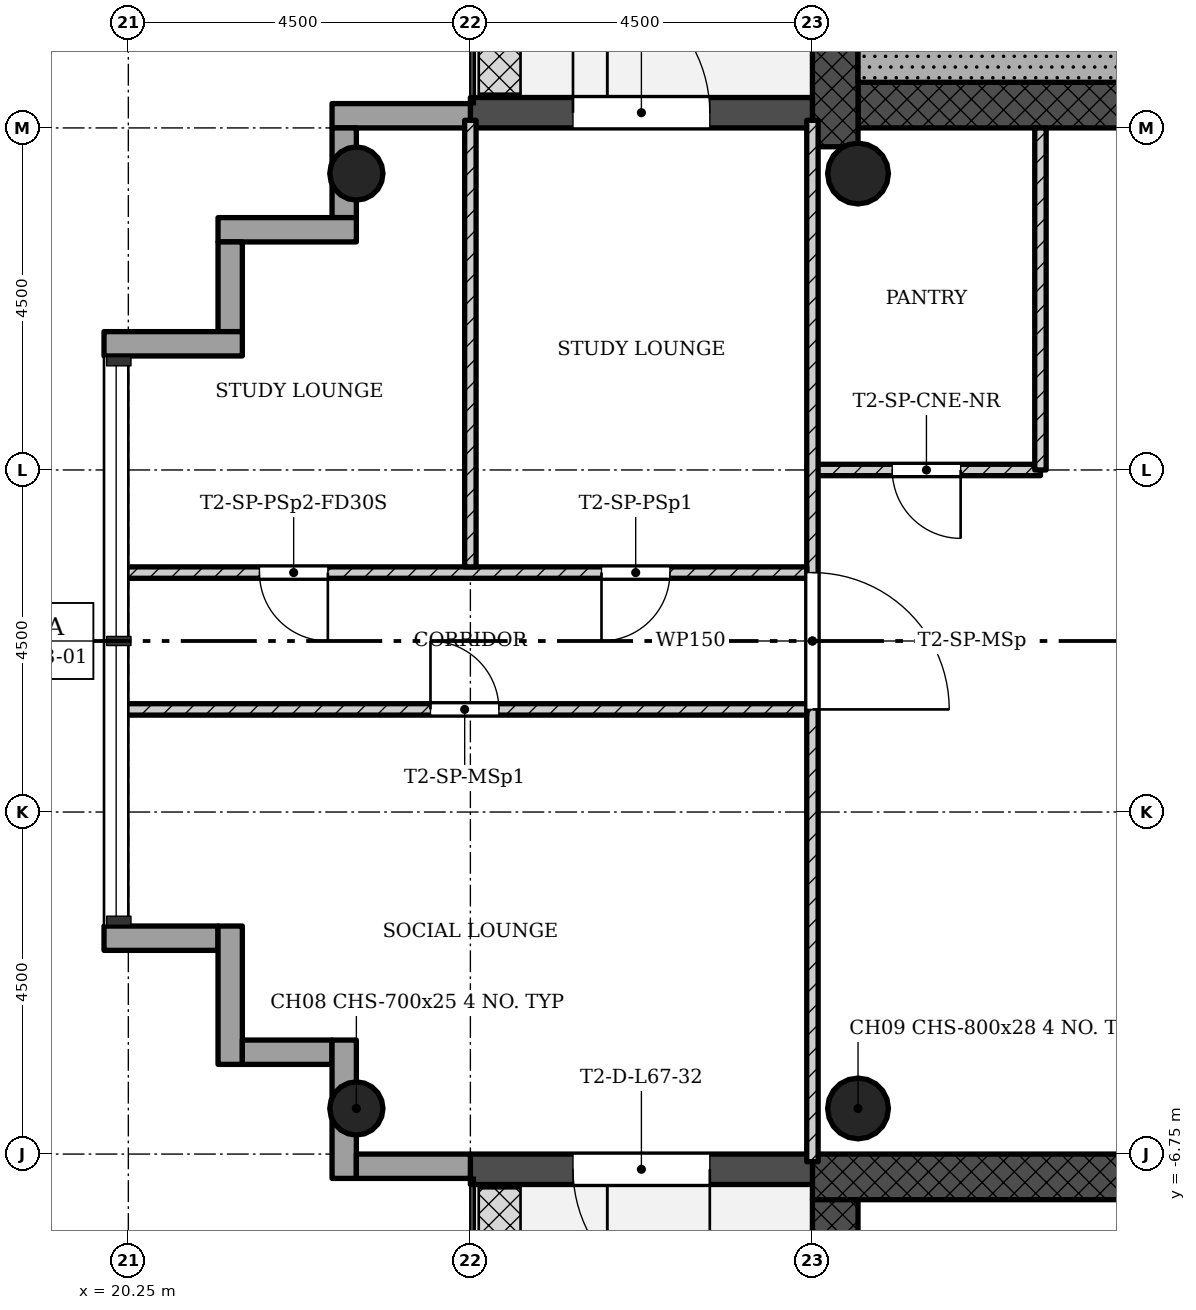
"""IFC4 building model, lengths in metres.
Left out: names, types, materials, properties, quantities, classifications, styles, units other than length and angle.
Written with IfcOpenShell. Run it as: python <this file> out.ifc"""

import sys

from ifc_helpers import new_model, si_unit, direction, frame, frame_2d, origin, origin_2d, place, context, subcontext, project, spatial, rectangle, hollow_circle, extrude, element, fill, save


model = new_model("IFC4")
c1 = context("Model", 3, precision=1e-05, world=origin(), true_north=direction((0.0, 1.0)))
c2 = subcontext(c1, "Body", "Model", "MODEL_VIEW")
j1 = project(units=[si_unit("LENGTHUNIT", "METRE"), si_unit("PLANEANGLEUNIT", "RADIAN")], contexts=[c1])
p1 = place(None, origin())
s1 = spatial("IfcSite", under=j1, at=p1, CompositionType="ELEMENT")
p2 = place(p1, origin())
s2 = spatial("IfcBuilding", under=s1, at=p2, CompositionType="ELEMENT")
p3 = place(p2, frame((0.0, 0.0, 242.4)))
s3 = spatial("IfcBuildingStorey", under=s2, at=p3, CompositionType="ELEMENT", Elevation=242.4)
p4 = place(p3, frame((29.85, 7.05, 0.0), z_axis=(0.0, 0.0, 1.0), x_axis=(1.0, 0.0, 0.0)))
e1 = element("IfcWall", 1, at=p4, inside=s3, PredefinedType="SHEAR", context=c2, shape_type="SweptSolid", body=[
    extrude(rectangle(XDim=12.9, YDim=0.6, at=frame_2d((6.45, 0.0))), origin(), (0.0, 0.0, 1.0), 4.5),
])
p5 = place(p4, frame((5.25, 0.0, 0.0)))
e2 = element("IfcOpeningElement", 2, at=p5, cuts=e1, PredefinedType="OPENING", context=c2, shape_type="SweptSolid", body=[
    extrude(rectangle(XDim=1.8, YDim=2.1, at=frame_2d((0.9, 1.05))), frame((0.0, 0.31, 0.0), z_axis=(0.0, -1.0, 0.0), x_axis=(1.0, 0.0, 0.0)), (0.0, 0.0, 1.0), 0.62),
])
p6 = place(p3, frame((29.55, 15.15, 0.0), z_axis=(0.0, 0.0, 1.0), x_axis=(0.0, -1.0, 0.0)))
e3 = element("IfcWall", 3, at=p6, inside=s3, PredefinedType="SHEAR", context=c2, shape_type="SweptSolid", body=[
    extrude(rectangle(XDim=8.648, YDim=0.6, at=frame_2d((4.324, 0.0))), origin(), (0.0, 0.0, 1.0), 4.5),
])
p7 = place(p3, frame((42.15, -7.05, 0.0), z_axis=(0.0, 0.0, 1.0), x_axis=(-1.0, 0.0, 0.0)))
e4 = element("IfcWall", 4, at=p7, inside=s3, PredefinedType="SHEAR", context=c2, shape_type="SweptSolid", body=[
    extrude(rectangle(XDim=12.9, YDim=0.6, at=frame_2d((6.45, 0.0))), origin(), (0.0, 0.0, 1.0), 4.5),
])
p8 = place(p7, frame((5.25, 0.0, 0.0)))
e5 = element("IfcOpeningElement", 5, at=p8, cuts=e4, PredefinedType="OPENING", context=c2, shape_type="SweptSolid", body=[
    extrude(rectangle(XDim=1.8, YDim=2.1, at=frame_2d((0.9, 1.05))), frame((0.0, 0.31, 0.0), z_axis=(0.0, -1.0, 0.0), x_axis=(1.0, 0.0, 0.0)), (0.0, 0.0, 1.0), 0.62),
])
p9 = place(p3, frame((29.55, -7.35, 0.0), z_axis=(0.0, 0.0, 1.0), x_axis=(0.0, -1.0, 0.0)))
e6 = element("IfcWall", 6, at=p9, inside=s3, PredefinedType="SHEAR", context=c2, shape_type="SweptSolid", body=[
    extrude(rectangle(XDim=8.4, YDim=0.6, at=frame_2d((4.2, 0.0))), origin(), (0.0, 0.0, 1.0), 4.5),
])
for number, where, z_axis, x_axis in (
    (7, (23.25, 6.15, 0.0), (0.0, 0.0, 1.0), (1.0, 0.0, 0.0)),
    (8, (23.25, -6.15, 0.0), (0.0, 0.0, 1.0), (1.0, 0.0, 0.0)),
):
    element("IfcColumn", number, at=place(p3, frame(where, z_axis=z_axis, x_axis=x_axis)), inside=s3, PredefinedType="COLUMN", context=c2, shape_type="SweptSolid", body=[
        extrude(hollow_circle(Radius=0.35, WallThickness=0.025, at=origin_2d()), origin(), (0.0, 0.0, 1.0), 4.5),
    ])
for number, where, z_axis, x_axis in (
    (9, (29.85, 6.15, 0.0), (0.0, 0.0, 1.0), (1.0, 0.0, 0.0)),
    (10, (29.85, -6.15, 0.0), (0.0, 0.0, 1.0), (1.0, 0.0, 0.0)),
):
    element("IfcColumn", number, at=place(p3, frame(where, z_axis=z_axis, x_axis=x_axis)), inside=s3, PredefinedType="COLUMN", context=c2, shape_type="SweptSolid", body=[
        extrude(hollow_circle(Radius=0.4, WallThickness=0.028, at=origin_2d()), origin(), (0.0, 0.0, 1.0), 4.5),
    ])
p10 = place(p3, frame((29.25, 6.95, -0.02), z_axis=(0.0, 0.0, 1.0), x_axis=(-1.0, 0.0, 0.0)))
e11 = element("IfcWall", 11, at=p10, inside=s3, PredefinedType="STANDARD", context=c2, shape_type="SweptSolid", body=[
    extrude(rectangle(XDim=4.5, YDim=0.4, at=frame_2d((2.25, 0.0))), origin(), (0.0, 0.0, 1.0), 4.22),
])
p11 = place(p10, frame((1.35, 0.0, 0.02)))
e12 = element("IfcOpeningElement", 12, at=p11, cuts=e11, PredefinedType="OPENING", context=c2, shape_type="SweptSolid", body=[
    extrude(rectangle(XDim=1.8, YDim=2.1, at=frame_2d((0.9, 1.05))), frame((0.0, 0.21, 0.0), z_axis=(0.0, -1.0, 0.0), x_axis=(1.0, 0.0, 0.0)), (0.0, 0.0, 1.0), 0.42),
])
p12 = place(p3, frame((24.75, 6.91, -0.3), z_axis=(0.0, 0.0, 1.0), x_axis=(-1.0, 0.0, 0.0)))
e13 = element("IfcWall", 13, at=p12, inside=s3, PredefinedType="STANDARD", context=c2, shape_type="SweptSolid", body=[
    extrude(rectangle(XDim=1.82, YDim=0.32, at=frame_2d((0.91, 0.0))), origin(), (0.0, 0.0, 1.0), 4.5),
])
p13 = place(p3, frame((23.09, 6.75, -0.3), z_axis=(0.0, 0.0, 1.0), x_axis=(0.0, -1.0, 0.0)))
e14 = element("IfcWall", 14, at=p13, inside=s3, PredefinedType="STANDARD", context=c2, shape_type="SweptSolid", body=[
    extrude(rectangle(XDim=1.18, YDim=0.32, at=frame_2d((0.59, 0.0))), origin(), (0.0, 0.0, 1.0), 4.5),
])
p14 = place(p3, frame((23.25, 5.41, -0.3), z_axis=(0.0, 0.0, 1.0), x_axis=(-1.0, 0.0, 0.0)))
e15 = element("IfcWall", 15, at=p14, inside=s3, PredefinedType="STANDARD", context=c2, shape_type="SweptSolid", body=[
    extrude(rectangle(XDim=1.82, YDim=0.32, at=frame_2d((0.91, 0.0))), origin(), (0.0, 0.0, 1.0), 4.5),
])
p15 = place(p3, frame((21.59, 5.25, -0.3), z_axis=(0.0, 0.0, 1.0), x_axis=(0.0, -1.0, 0.0)))
e16 = element("IfcWall", 16, at=p15, inside=s3, PredefinedType="STANDARD", context=c2, shape_type="SweptSolid", body=[
    extrude(rectangle(XDim=1.18, YDim=0.32, at=frame_2d((0.59, 0.0))), origin(), (0.0, 0.0, 1.0), 4.5),
])
p16 = place(p3, frame((21.75, 3.91, -0.3), z_axis=(0.0, 0.0, 1.0), x_axis=(-1.0, 0.0, 0.0)))
e17 = element("IfcWall", 17, at=p16, inside=s3, PredefinedType="STANDARD", context=c2, shape_type="SweptSolid", body=[
    extrude(rectangle(XDim=1.82, YDim=0.32, at=frame_2d((0.91, 0.0))), origin(), (0.0, 0.0, 1.0), 4.5),
])
p17 = place(p3, frame((19.93, -3.91, -0.3), z_axis=(0.0, 0.0, 1.0), x_axis=(1.0, 0.0, 0.0)))
e18 = element("IfcWall", 18, at=p17, inside=s3, PredefinedType="STANDARD", context=c2, shape_type="SweptSolid", body=[
    extrude(rectangle(XDim=1.5, YDim=0.32, at=frame_2d((0.75, 0.0))), origin(), (0.0, 0.0, 1.0), 4.5),
])
p18 = place(p3, frame((21.59, -3.75, -0.3), z_axis=(0.0, 0.0, 1.0), x_axis=(0.0, -1.0, 0.0)))
e19 = element("IfcWall", 19, at=p18, inside=s3, PredefinedType="STANDARD", context=c2, shape_type="SweptSolid", body=[
    extrude(rectangle(XDim=1.82, YDim=0.32, at=frame_2d((0.91, 0.0))), origin(), (0.0, 0.0, 1.0), 4.5),
])
p19 = place(p3, frame((21.75, -5.41, -0.3), z_axis=(0.0, 0.0, 1.0), x_axis=(1.0, 0.0, 0.0)))
e20 = element("IfcWall", 20, at=p19, inside=s3, PredefinedType="STANDARD", context=c2, shape_type="SweptSolid", body=[
    extrude(rectangle(XDim=1.18, YDim=0.32, at=frame_2d((0.59, 0.0))), origin(), (0.0, 0.0, 1.0), 4.5),
])
p20 = place(p3, frame((23.09, -5.25, -0.3), z_axis=(0.0, 0.0, 1.0), x_axis=(0.0, -1.0, 0.0)))
e21 = element("IfcWall", 21, at=p20, inside=s3, PredefinedType="STANDARD", context=c2, shape_type="SweptSolid", body=[
    extrude(rectangle(XDim=1.82, YDim=0.32, at=frame_2d((0.91, 0.0))), origin(), (0.0, 0.0, 1.0), 4.5),
])
p21 = place(p3, frame((23.25, -6.91, -0.3), z_axis=(0.0, 0.0, 1.0), x_axis=(1.0, 0.0, 0.0)))
e22 = element("IfcWall", 22, at=p21, inside=s3, PredefinedType="STANDARD", context=c2, shape_type="SweptSolid", body=[
    extrude(rectangle(XDim=1.5, YDim=0.32, at=frame_2d((0.75, 0.0))), origin(), (0.0, 0.0, 1.0), 4.5),
])
p22 = place(p3, frame((24.75, -6.95, -0.02), z_axis=(0.0, 0.0, 1.0), x_axis=(1.0, 0.0, 0.0)))
e23 = element("IfcWall", 23, at=p22, inside=s3, PredefinedType="STANDARD", context=c2, shape_type="SweptSolid", body=[
    extrude(rectangle(XDim=4.5, YDim=0.4, at=frame_2d((2.25, 0.0))), origin(), (0.0, 0.0, 1.0), 4.22),
])
p23 = place(p22, frame((1.35, 0.0, 0.02)))
e24 = element("IfcOpeningElement", 24, at=p23, cuts=e23, PredefinedType="OPENING", context=c2, shape_type="SweptSolid", body=[
    extrude(rectangle(XDim=1.8, YDim=2.1, at=frame_2d((0.9, 1.05))), frame((0.0, 0.21, 0.0), z_axis=(0.0, -1.0, 0.0), x_axis=(1.0, 0.0, 0.0)), (0.0, 0.0, 1.0), 0.42),
])
p24 = place(p3, frame((32.25, 2.25, 0.0), z_axis=(0.0, 0.0, 1.0), x_axis=(-1.0, 0.0, 0.0)))
e25 = element("IfcWall", 25, at=p24, inside=s3, PredefinedType="PARTITIONING", context=c2, shape_type="SweptSolid", body=[
    extrude(rectangle(XDim=3.0, YDim=0.15, at=frame_2d((1.5, 0.0))), origin(), (0.0, 0.0, 1.0), 4.08),
])
p25 = place(p24, frame((1.05, 0.0, 0.0)))
e26 = element("IfcOpeningElement", 26, at=p25, cuts=e25, PredefinedType="OPENING", context=c2, shape_type="SweptSolid", body=[
    extrude(rectangle(XDim=0.9, YDim=2.1, at=frame_2d((0.45, 1.05))), frame((0.0, 0.085, 0.0), z_axis=(0.0, -1.0, 0.0), x_axis=(1.0, 0.0, 0.0)), (0.0, 0.0, 1.0), 0.17),
])
p26 = place(p3, frame((32.25, 2.25, 0.0), z_axis=(0.0, 0.0, 1.0), x_axis=(0.0, 1.0, 0.0)))
e27 = element("IfcWall", 27, at=p26, inside=s3, PredefinedType="PARTITIONING", context=c2, shape_type="SweptSolid", body=[
    extrude(rectangle(XDim=4.5, YDim=0.15, at=frame_2d((2.25, 0.0))), origin(), (0.0, 0.0, 1.0), 4.08),
])
p27 = place(p3, frame((29.25, -6.85, 0.0), z_axis=(0.0, 0.0, 1.0), x_axis=(0.0, 1.0, 0.0)))
e28 = element("IfcWall", 28, at=p27, inside=s3, PredefinedType="PARTITIONING", context=c2, shape_type="SweptSolid", body=[
    extrude(rectangle(XDim=13.7, YDim=0.15, at=frame_2d((6.85, 0.0))), origin(), (0.0, 0.0, 1.0), 4.08),
])
p28 = place(p27, frame((5.95, 0.0, 0.0)))
e29 = element("IfcOpeningElement", 29, at=p28, cuts=e28, PredefinedType="OPENING", context=c2, shape_type="SweptSolid", body=[
    extrude(rectangle(XDim=1.8, YDim=2.1, at=frame_2d((0.9, 1.05))), frame((0.0, 0.085, 0.0), z_axis=(0.0, -1.0, 0.0), x_axis=(1.0, 0.0, 0.0)), (0.0, 0.0, 1.0), 0.17),
])
p29 = place(p3, frame((29.175, 0.9, 0.0), z_axis=(0.0, 0.0, 1.0), x_axis=(-1.0, 0.0, 0.0)))
e30 = element("IfcWall", 30, at=p29, inside=s3, PredefinedType="PARTITIONING", context=c2, shape_type="SweptSolid", body=[
    extrude(rectangle(XDim=9.025, YDim=0.15, at=frame_2d((4.513, 0.0))), origin(), (0.0, 0.0, 1.0), 4.08),
])
p30 = place(p29, frame((1.8, 0.0, 0.0)))
e31 = element("IfcOpeningElement", 31, at=p30, cuts=e30, PredefinedType="OPENING", context=c2, shape_type="SweptSolid", body=[
    extrude(rectangle(XDim=0.9, YDim=2.1, at=frame_2d((0.45, 1.05))), frame((0.0, 0.085, 0.0), z_axis=(0.0, -1.0, 0.0), x_axis=(1.0, 0.0, 0.0)), (0.0, 0.0, 1.0), 0.17),
])
p31 = place(p29, frame((6.3, 0.0, 0.0)))
e32 = element("IfcOpeningElement", 32, at=p31, cuts=e30, PredefinedType="OPENING", context=c2, shape_type="SweptSolid", body=[
    extrude(rectangle(XDim=0.9, YDim=2.1, at=frame_2d((0.45, 1.05))), frame((0.0, 0.085, 0.0), z_axis=(0.0, -1.0, 0.0), x_axis=(1.0, 0.0, 0.0)), (0.0, 0.0, 1.0), 0.17),
])
p32 = place(p3, frame((24.75, 0.975, 0.0), z_axis=(0.0, 0.0, 1.0), x_axis=(0.0, 1.0, 0.0)))
e33 = element("IfcWall", 33, at=p32, inside=s3, PredefinedType="PARTITIONING", context=c2, shape_type="SweptSolid", body=[
    extrude(rectangle(XDim=5.875, YDim=0.15, at=frame_2d((2.938, 0.0))), origin(), (0.0, 0.0, 1.0), 4.08),
])
p33 = place(p3, frame((29.175, -0.9, 0.0), z_axis=(0.0, 0.0, 1.0), x_axis=(-1.0, 0.0, 0.0)))
e34 = element("IfcWall", 34, at=p33, inside=s3, PredefinedType="PARTITIONING", context=c2, shape_type="SweptSolid", body=[
    extrude(rectangle(XDim=9.025, YDim=0.15, at=frame_2d((4.513, 0.0))), origin(), (0.0, 0.0, 1.0), 4.08),
])
p34 = place(p33, frame((4.05, 0.0, 0.0)))
e35 = element("IfcOpeningElement", 35, at=p34, cuts=e34, PredefinedType="OPENING", context=c2, shape_type="SweptSolid", body=[
    extrude(rectangle(XDim=0.9, YDim=2.1, at=frame_2d((0.45, 1.05))), frame((0.0, 0.085, 0.0), z_axis=(0.0, -1.0, 0.0), x_axis=(1.0, 0.0, 0.0)), (0.0, 0.0, 1.0), 0.17),
])
p35 = place(p3, frame((34.15, 7.65, 0.0), z_axis=(0.0, 0.0, 1.0), x_axis=(-1.0, 0.0, 0.0)))
e36 = element("IfcWall", 36, at=p35, inside=s3, PredefinedType="SHEAR", context=c2, shape_type="SweptSolid", body=[
    extrude(rectangle(XDim=4.3, YDim=0.6, at=frame_2d((2.15, 0.0))), origin(), (0.0, 0.0, 1.0), 4.5),
])
p36 = place(p11, origin())
e37 = element("IfcDoor", 37, at=p36, inside=s3, OperationType="SINGLE_SWING_RIGHT", PredefinedType="DOOR", context=c2, shape_type="SweptSolid", body=[
    extrude(rectangle(XDim=1.8, YDim=2.1, at=frame_2d((0.9, 1.05))), frame((0.0, 0.025, 0.0), z_axis=(0.0, -1.0, 0.0), x_axis=(1.0, 0.0, 0.0)), (0.0, 0.0, 1.0), 0.05),
])
fill(e12, e37)
p37 = place(p23, origin())
e38 = element("IfcDoor", 38, at=p37, inside=s3, OperationType="SINGLE_SWING_RIGHT", PredefinedType="DOOR", context=c2, shape_type="SweptSolid", body=[
    extrude(rectangle(XDim=1.8, YDim=2.1, at=frame_2d((0.9, 1.05))), frame((0.0, 0.025, 0.0), z_axis=(0.0, -1.0, 0.0), x_axis=(1.0, 0.0, 0.0)), (0.0, 0.0, 1.0), 0.05),
])
fill(e24, e38)
p38 = place(p25, origin())
e39 = element("IfcDoor", 39, at=p38, inside=s3, OperationType="SINGLE_SWING_RIGHT", PredefinedType="DOOR", context=c2, shape_type="SweptSolid", body=[
    extrude(rectangle(XDim=0.9, YDim=2.1, at=frame_2d((0.45, 1.05))), frame((0.0, 0.025, 0.0), z_axis=(0.0, -1.0, 0.0), x_axis=(1.0, 0.0, 0.0)), (0.0, 0.0, 1.0), 0.05),
])
fill(e26, e39)
p39 = place(p28, origin())
e40 = element("IfcDoor", 40, at=p39, inside=s3, OperationType="SINGLE_SWING_LEFT", PredefinedType="DOOR", context=c2, shape_type="SweptSolid", body=[
    extrude(rectangle(XDim=1.8, YDim=2.1, at=frame_2d((0.9, 1.05))), frame((0.0, 0.025, 0.0), z_axis=(0.0, -1.0, 0.0), x_axis=(1.0, 0.0, 0.0)), (0.0, 0.0, 1.0), 0.05),
])
fill(e29, e40)
p40 = place(p30, origin())
e41 = element("IfcDoor", 41, at=p40, inside=s3, OperationType="SINGLE_SWING_LEFT", PredefinedType="DOOR", context=c2, shape_type="SweptSolid", body=[
    extrude(rectangle(XDim=0.9, YDim=2.1, at=frame_2d((0.45, 1.05))), frame((0.0, 0.025, 0.0), z_axis=(0.0, -1.0, 0.0), x_axis=(1.0, 0.0, 0.0)), (0.0, 0.0, 1.0), 0.05),
])
fill(e31, e41)
p41 = place(p31, origin())
e42 = element("IfcDoor", 42, at=p41, inside=s3, OperationType="SINGLE_SWING_RIGHT", PredefinedType="DOOR", context=c2, shape_type="SweptSolid", body=[
    extrude(rectangle(XDim=0.9, YDim=2.1, at=frame_2d((0.45, 1.05))), frame((0.0, 0.025, 0.0), z_axis=(0.0, -1.0, 0.0), x_axis=(1.0, 0.0, 0.0)), (0.0, 0.0, 1.0), 0.05),
])
fill(e32, e42)
p42 = place(p34, origin())
e43 = element("IfcDoor", 43, at=p42, inside=s3, OperationType="SINGLE_SWING_RIGHT", PredefinedType="DOOR", context=c2, shape_type="SweptSolid", body=[
    extrude(rectangle(XDim=0.9, YDim=2.1, at=frame_2d((0.45, 1.05))), frame((0.0, 0.025, 0.0), z_axis=(0.0, -1.0, 0.0), x_axis=(1.0, 0.0, 0.0)), (0.0, 0.0, 1.0), 0.05),
])
fill(e35, e43)
save(model, sys.argv[1])
